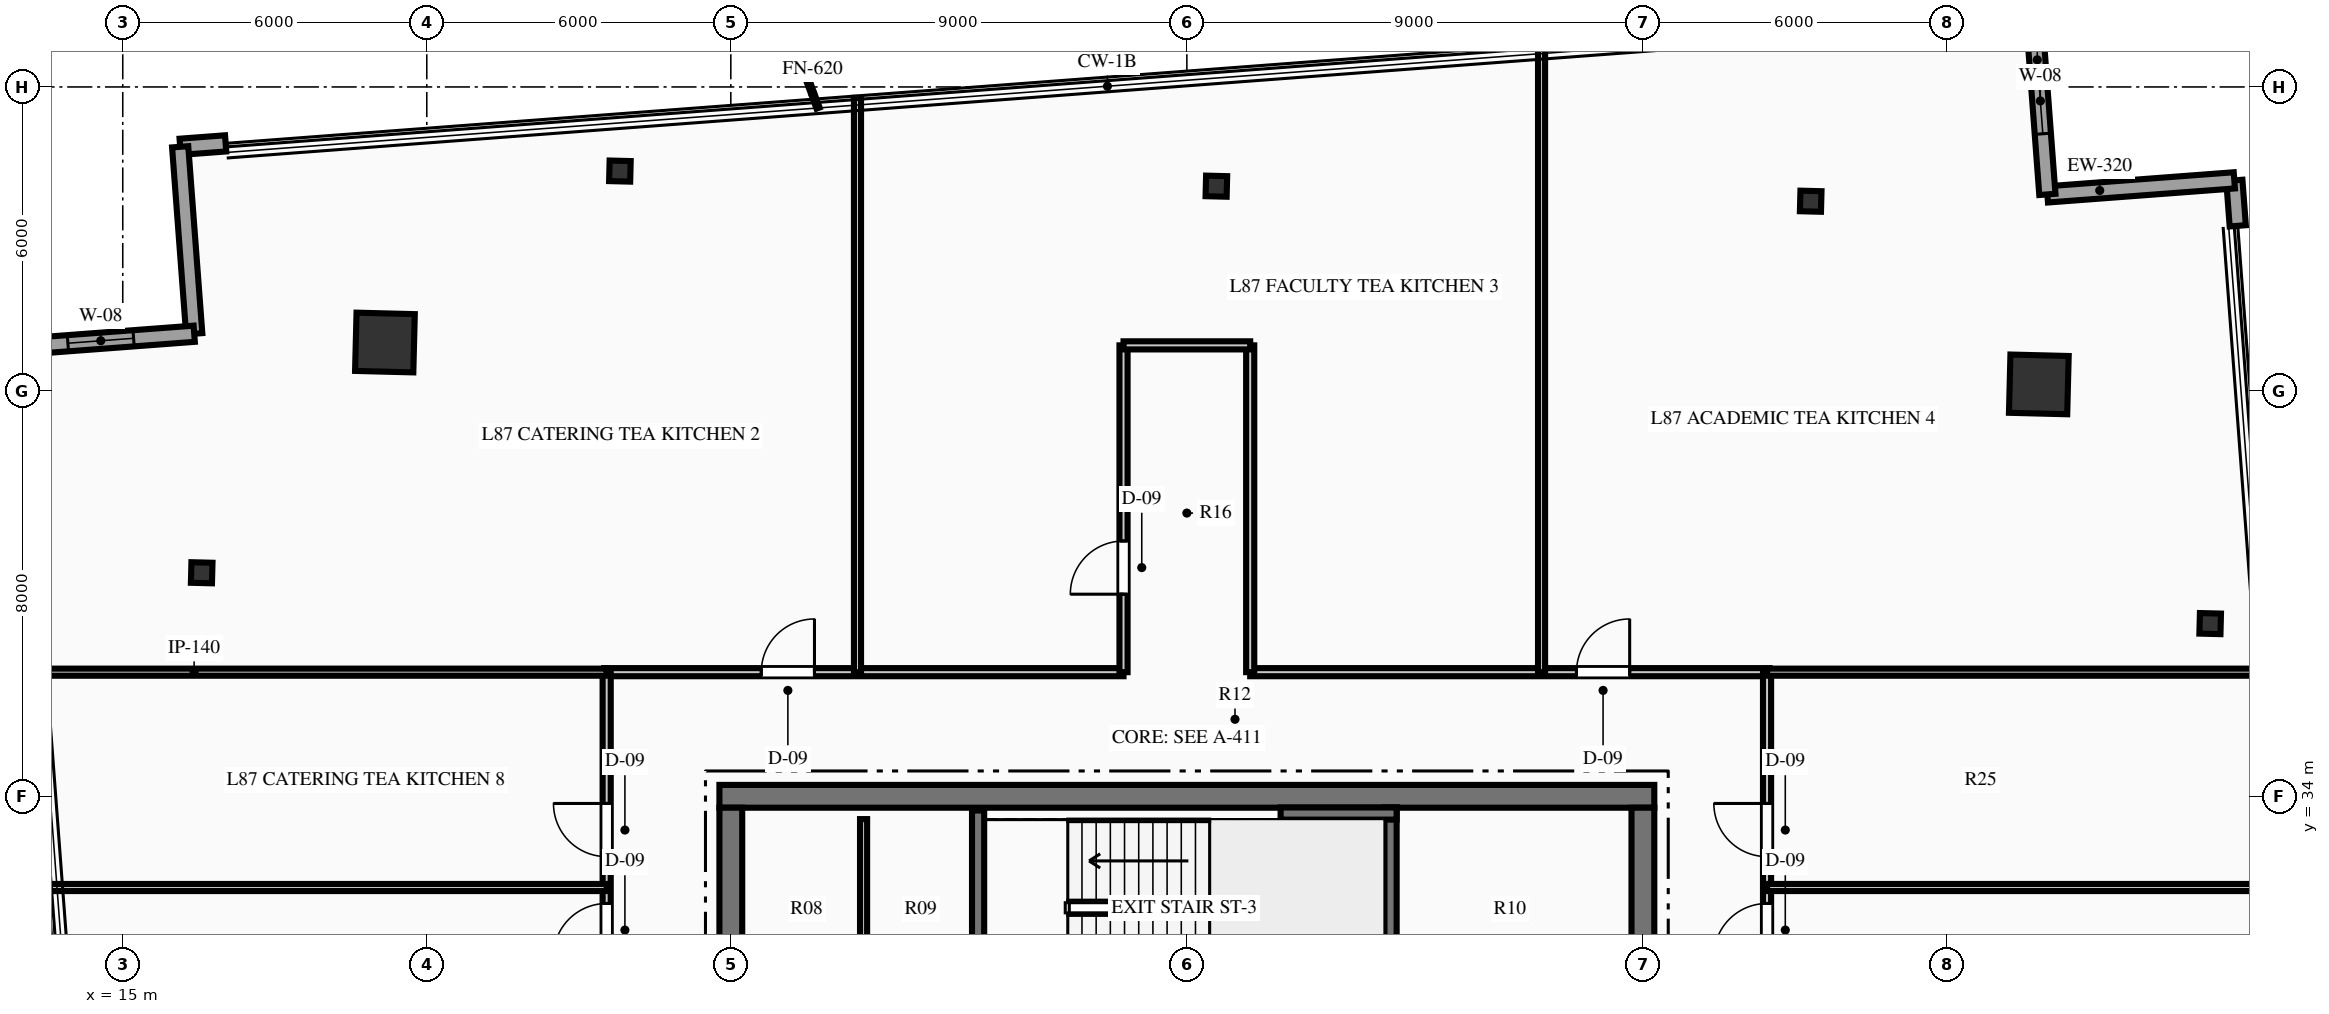
"""IFC4 building model, lengths in metres.
Left out: names, types, materials, properties, quantities, classifications, styles, units other than length and angle.
Written with IfcOpenShell. Run it as: python <this file> out.ifc"""

import sys

from ifc_helpers import new_model, si_unit, direction, frame, frame_2d, origin, origin_2d, place, context, subcontext, project, spatial, rectangle, hollow_rectangle, i_section, extrude, element, fill, save


model = new_model("IFC4")
c1 = context("Model", 3, precision=1e-05, world=origin(), true_north=direction((0.0, 1.0)))
c2 = subcontext(c1, "Body", "Model", "MODEL_VIEW")
j1 = project(units=[si_unit("LENGTHUNIT", "METRE"), si_unit("PLANEANGLEUNIT", "RADIAN")], contexts=[c1])
p1 = place(None, origin())
s1 = spatial("IfcSite", under=j1, at=p1, CompositionType="ELEMENT")
p2 = place(p1, origin())
s2 = spatial("IfcBuilding", under=s1, at=p2, CompositionType="ELEMENT")
p3 = place(p2, frame((0.0, 0.0, 343.95)))
s3 = spatial("IfcBuildingStorey", under=s2, at=p3, CompositionType="ELEMENT", Elevation=343.95)
p4 = place(p3, frame((26.775, 34.0, 0.0), z_axis=(0.0, 0.0, 1.0), x_axis=(1.0, 0.0, 0.0)))
e1 = element("IfcWall", 1, at=p4, inside=s3, PredefinedType="SHEAR", context=c2, shape_type="SweptSolid", body=[
    extrude(rectangle(XDim=18.45, YDim=0.45, at=frame_2d((9.225, 0.0))), origin(), (0.0, 0.0, 1.0), 3.75),
])
p5 = place(p3, frame((27.0, 18.225, 0.0), z_axis=(0.0, 0.0, 1.0), x_axis=(0.0, 1.0, 0.0)))
e2 = element("IfcWall", 2, at=p5, inside=s3, PredefinedType="SHEAR", context=c2, shape_type="SweptSolid", body=[
    extrude(rectangle(XDim=15.55, YDim=0.45, at=frame_2d((7.775, 0.0))), origin(), (0.0, 0.0, 1.0), 3.75),
])
p6 = place(p5, frame((10.015, 0.0, 0.0)))
e3 = element("IfcOpeningElement", 3, at=p6, cuts=e2, PredefinedType="OPENING", context=c2, shape_type="SweptSolid", body=[
    extrude(rectangle(XDim=1.4, YDim=2.2, at=frame_2d((0.7, 1.1))), frame((0.0, 0.235, 0.0), z_axis=(0.0, -1.0, 0.0), x_axis=(1.0, 0.0, 0.0)), (0.0, 0.0, 1.0), 0.47),
])
p7 = place(p3, frame((45.0, 18.225, 0.0), z_axis=(0.0, 0.0, 1.0), x_axis=(0.0, 1.0, 0.0)))
e4 = element("IfcWall", 4, at=p7, inside=s3, PredefinedType="SHEAR", context=c2, shape_type="SweptSolid", body=[
    extrude(rectangle(XDim=15.55, YDim=0.45, at=frame_2d((7.775, 0.0))), origin(), (0.0, 0.0, 1.0), 3.75),
])
p8 = place(p7, frame((10.015, 0.0, 0.0)))
e5 = element("IfcOpeningElement", 5, at=p8, cuts=e4, PredefinedType="OPENING", context=c2, shape_type="SweptSolid", body=[
    extrude(rectangle(XDim=1.4, YDim=2.2, at=frame_2d((0.7, 1.1))), frame((0.0, 0.235, 0.0), z_axis=(0.0, -1.0, 0.0), x_axis=(1.0, 0.0, 0.0)), (0.0, 0.0, 1.0), 0.47),
])
p9 = place(p3, frame((31.88, 29.93, 0.0), z_axis=(0.0, 0.0, 1.0), x_axis=(0.0, 1.0, 0.0)))
e6 = element("IfcWall", 6, at=p9, inside=s3, PredefinedType="SHEAR", context=c2, shape_type="SweptSolid", body=[
    extrude(rectangle(XDim=3.79, YDim=0.24, at=frame_2d((1.895, 0.0))), origin(), (0.0, 0.0, 1.0), 3.75),
])
p10 = place(p3, frame((40.02, 29.93, 0.0), z_axis=(0.0, 0.0, 1.0), x_axis=(0.0, 1.0, 0.0)))
e7 = element("IfcWall", 7, at=p10, inside=s3, PredefinedType="SHEAR", context=c2, shape_type="SweptSolid", body=[
    extrude(rectangle(XDim=3.85, YDim=0.24, at=frame_2d((1.925, 0.0))), origin(), (0.0, 0.0, 1.0), 3.75),
])
p11 = place(p3, frame((37.85, 33.66, 0.0), z_axis=(0.0, 0.0, 1.0), x_axis=(1.0, 0.0, 0.0)))
e8 = element("IfcWall", 8, at=p11, inside=s3, PredefinedType="SHEAR", context=c2, shape_type="SweptSolid", body=[
    extrude(rectangle(XDim=2.29, YDim=0.24, at=frame_2d((1.145, 0.0))), origin(), (0.0, 0.0, 1.0), 3.75),
])
for number, where, z_axis, x_axis in (
    (9, (52.813, 42.13, 0.0), (0.0, 0.0, 1.0), (0.025, 1.0, 0.0)),
    (10, (20.174, 42.956, 0.0), (0.0, 0.0, 1.0), (0.025, 1.0, 0.0)),
):
    element("IfcColumn", number, at=place(p3, frame(where, z_axis=z_axis, x_axis=x_axis)), inside=s3, PredefinedType="COLUMN", context=c2, shape_type="SweptSolid", body=[
        extrude(hollow_rectangle(XDim=1.15, YDim=1.15, WallThickness=0.05, at=origin_2d()), origin(), (0.0, 0.0, 1.0), 3.75),
    ])
for number, where, z_axis, x_axis in (
    (11, (56.195, 37.409, 0.0), (0.0, 0.0, 1.0), (0.025, 1.0, 0.0)),
    (12, (48.312, 45.745, 0.0), (0.0, 0.0, 1.0), (0.025, 1.0, 0.0)),
    (13, (36.582, 46.042, 0.0), (0.0, 0.0, 1.0), (0.025, 1.0, 0.0)),
    (14, (24.811, 46.34, 0.0), (0.0, 0.0, 1.0), (0.025, 1.0, 0.0)),
    (15, (16.558, 38.412, 0.0), (0.0, 0.0, 1.0), (0.025, 1.0, 0.0)),
):
    element("IfcColumn", number, at=place(p3, frame(where, z_axis=z_axis, x_axis=x_axis)), inside=s3, PredefinedType="COLUMN", context=c2, shape_type="SweptSolid", body=[
        extrude(i_section(OverallWidth=0.406, OverallDepth=0.416, WebThickness=0.03, FlangeThickness=0.048, at=origin_2d()), origin(), (0.0, 0.0, 1.0), 3.75),
    ])
p12 = place(p3, frame((56.672, 46.157, 0.0), z_axis=(0.0, 0.0, 1.0), x_axis=(0.075140616575, -0.997172947758, 0.0)))
e16 = element("IfcWall", 16, at=p12, inside=s3, PredefinedType="STANDARD", context=c2, shape_type="SweptSolid", body=[
    extrude(rectangle(XDim=0.9, YDim=0.32, at=frame_2d((0.45, 0.0))), origin(), (0.0, 0.0, 1.0), 3.43),
])
p13 = place(p3, frame((52.982, 45.879, 0.0), z_axis=(0.0, 0.0, 1.0), x_axis=(0.99718649992, 0.074960552138, 0.0)))
e17 = element("IfcWall", 17, at=p13, inside=s3, PredefinedType="STANDARD", context=c2, shape_type="SweptSolid", body=[
    extrude(rectangle(XDim=3.7, YDim=0.32, at=frame_2d((1.85, 0.0))), origin(), (0.0, 0.0, 1.0), 3.43),
])
p14 = place(p3, frame((52.705, 49.569, 0.0), z_axis=(0.0, 0.0, 1.0), x_axis=(0.075026167269, -0.997181565325, 0.0)))
e18 = element("IfcWall", 18, at=p14, inside=s3, PredefinedType="STANDARD", context=c2, shape_type="SweptSolid", body=[
    extrude(rectangle(XDim=3.7, YDim=0.32, at=frame_2d((1.85, 0.0))), origin(), (0.0, 0.0, 1.0), 3.43),
])
p15 = place(p14, frame((1.2, 0.0, 0.85)))
e19 = element("IfcOpeningElement", 19, at=p15, cuts=e18, PredefinedType="OPENING", context=c2, shape_type="SweptSolid", body=[
    extrude(rectangle(XDim=1.3, YDim=1.9, at=frame_2d((0.65, 0.95))), frame((0.0, 0.17, 0.0), z_axis=(0.0, -1.0, 0.0), x_axis=(1.0, 0.0, 0.0)), (0.0, 0.0, 1.0), 0.34),
])
p16 = place(p3, frame((16.133, 46.819, 0.0), z_axis=(0.0, 0.0, 1.0), x_axis=(0.997193237142, 0.074870874171, 0.0)))
e20 = element("IfcWall", 20, at=p16, inside=s3, PredefinedType="STANDARD", context=c2, shape_type="SweptSolid", body=[
    extrude(rectangle(XDim=0.9, YDim=0.32, at=frame_2d((0.45, 0.0))), origin(), (0.0, 0.0, 1.0), 3.43),
])
p17 = place(p3, frame((16.41, 43.129, 0.0), z_axis=(0.0, 0.0, 1.0), x_axis=(-0.074955620001, 0.997186870667, 0.0)))
e21 = element("IfcWall", 21, at=p17, inside=s3, PredefinedType="STANDARD", context=c2, shape_type="SweptSolid", body=[
    extrude(rectangle(XDim=3.7, YDim=0.32, at=frame_2d((1.85, 0.0))), origin(), (0.0, 0.0, 1.0), 3.43),
])
p18 = place(p3, frame((12.721, 42.852, 0.0), z_axis=(0.0, 0.0, 1.0), x_axis=(0.99718649992, 0.074960552138, 0.0)))
e22 = element("IfcWall", 22, at=p18, inside=s3, PredefinedType="STANDARD", context=c2, shape_type="SweptSolid", body=[
    extrude(rectangle(XDim=3.7, YDim=0.32, at=frame_2d((1.85, 0.0))), origin(), (0.0, 0.0, 1.0), 3.43),
])
p19 = place(p18, frame((1.2, 0.0, 0.85)))
e23 = element("IfcOpeningElement", 23, at=p19, cuts=e22, PredefinedType="OPENING", context=c2, shape_type="SweptSolid", body=[
    extrude(rectangle(XDim=1.3, YDim=1.9, at=frame_2d((0.65, 0.95))), frame((0.0, 0.17, 0.0), z_axis=(0.0, -1.0, 0.0), x_axis=(1.0, 0.0, 0.0)), (0.0, 0.0, 1.0), 0.34),
])
p20 = place(p3, frame((29.62, 29.95, 0.0), z_axis=(0.0, 0.0, 1.0), x_axis=(0.0, 1.0, 0.0)))
e24 = element("IfcWall", 24, at=p20, inside=s3, PredefinedType="PARTITIONING", context=c2, shape_type="SweptSolid", body=[
    extrude(rectangle(XDim=3.6, YDim=0.14, at=frame_2d((1.8, 0.0))), origin(), (0.0, 0.0, 1.0), 3.43),
])
p21 = place(p3, frame((24.5, 36.45, 0.0), z_axis=(0.0, 0.0, 1.0), x_axis=(1.0, 0.0, 0.0)))
e25 = element("IfcWall", 25, at=p21, inside=s3, PredefinedType="PARTITIONING", context=c2, shape_type="SweptSolid", body=[
    extrude(rectangle(XDim=10.25, YDim=0.16, at=frame_2d((5.125, 0.0))), origin(), (0.0, 0.0, 1.0), 3.43),
])
p22 = place(p21, frame((3.101, 0.0, 0.0)))
e26 = element("IfcOpeningElement", 26, at=p22, cuts=e25, PredefinedType="OPENING", context=c2, shape_type="SweptSolid", body=[
    extrude(rectangle(XDim=1.05, YDim=2.15, at=frame_2d((0.525, 1.075))), frame((0.0, 0.09, 0.0), z_axis=(0.0, -1.0, 0.0), x_axis=(1.0, 0.0, 0.0)), (0.0, 0.0, 1.0), 0.18),
])
p23 = place(p3, frame((37.25, 36.45, 0.0), z_axis=(0.0, 0.0, 1.0), x_axis=(1.0, 0.0, 0.0)))
e27 = element("IfcWall", 27, at=p23, inside=s3, PredefinedType="PARTITIONING", context=c2, shape_type="SweptSolid", body=[
    extrude(rectangle(XDim=10.25, YDim=0.16, at=frame_2d((5.125, 0.0))), origin(), (0.0, 0.0, 1.0), 3.43),
])
p24 = place(p23, frame((6.439, 0.0, 0.0)))
e28 = element("IfcOpeningElement", 28, at=p24, cuts=e27, PredefinedType="OPENING", context=c2, shape_type="SweptSolid", body=[
    extrude(rectangle(XDim=1.05, YDim=2.15, at=frame_2d((0.525, 1.075))), frame((0.0, 0.09, 0.0), z_axis=(0.0, -1.0, 0.0), x_axis=(1.0, 0.0, 0.0)), (0.0, 0.0, 1.0), 0.18),
])
p25 = place(p3, frame((24.55, 27.25, 0.0), z_axis=(0.0, 0.0, 1.0), x_axis=(0.0, 1.0, 0.0)))
e29 = element("IfcWall", 29, at=p25, inside=s3, PredefinedType="PARTITIONING", context=c2, shape_type="SweptSolid", body=[
    extrude(rectangle(XDim=9.2, YDim=0.16, at=frame_2d((4.6, 0.0))), origin(), (0.0, 0.0, 1.0), 3.43),
])
p26 = place(p25, frame((3.585, 0.0, 0.0)))
e30 = element("IfcOpeningElement", 30, at=p26, cuts=e29, PredefinedType="OPENING", context=c2, shape_type="SweptSolid", body=[
    extrude(rectangle(XDim=1.05, YDim=2.15, at=frame_2d((0.525, 1.075))), frame((0.0, 0.09, 0.0), z_axis=(0.0, -1.0, 0.0), x_axis=(1.0, 0.0, 0.0)), (0.0, 0.0, 1.0), 0.18),
])
p27 = place(p25, frame((5.559, 0.0, 0.0)))
e31 = element("IfcOpeningElement", 31, at=p27, cuts=e29, PredefinedType="OPENING", context=c2, shape_type="SweptSolid", body=[
    extrude(rectangle(XDim=1.05, YDim=2.15, at=frame_2d((0.525, 1.075))), frame((0.0, 0.09, 0.0), z_axis=(0.0, -1.0, 0.0), x_axis=(1.0, 0.0, 0.0)), (0.0, 0.0, 1.0), 0.18),
])
p28 = place(p3, frame((47.45, 27.25, 0.0), z_axis=(0.0, 0.0, 1.0), x_axis=(0.0, 1.0, 0.0)))
e32 = element("IfcWall", 32, at=p28, inside=s3, PredefinedType="PARTITIONING", context=c2, shape_type="SweptSolid", body=[
    extrude(rectangle(XDim=9.2, YDim=0.16, at=frame_2d((4.6, 0.0))), origin(), (0.0, 0.0, 1.0), 3.43),
])
p29 = place(p28, frame((3.585, 0.0, 0.0)))
e33 = element("IfcOpeningElement", 33, at=p29, cuts=e32, PredefinedType="OPENING", context=c2, shape_type="SweptSolid", body=[
    extrude(rectangle(XDim=1.05, YDim=2.15, at=frame_2d((0.525, 1.075))), frame((0.0, 0.09, 0.0), z_axis=(0.0, -1.0, 0.0), x_axis=(1.0, 0.0, 0.0)), (0.0, 0.0, 1.0), 0.18),
])
p30 = place(p28, frame((5.559, 0.0, 0.0)))
e34 = element("IfcOpeningElement", 34, at=p30, cuts=e32, PredefinedType="OPENING", context=c2, shape_type="SweptSolid", body=[
    extrude(rectangle(XDim=1.05, YDim=2.15, at=frame_2d((0.525, 1.075))), frame((0.0, 0.09, 0.0), z_axis=(0.0, -1.0, 0.0), x_axis=(1.0, 0.0, 0.0)), (0.0, 0.0, 1.0), 0.18),
])
p31 = place(p3, frame((34.75, 36.45, 0.0), z_axis=(0.0, 0.0, 1.0), x_axis=(0.0, 1.0, 0.0)))
e35 = element("IfcWall", 35, at=p31, inside=s3, PredefinedType="PARTITIONING", context=c2, shape_type="SweptSolid", body=[
    extrude(rectangle(XDim=6.45, YDim=0.16, at=frame_2d((3.225, 0.0))), origin(), (0.0, 0.0, 1.0), 3.43),
])
p32 = place(p31, frame((1.539, 0.0, 0.0)))
e36 = element("IfcOpeningElement", 36, at=p32, cuts=e35, PredefinedType="OPENING", context=c2, shape_type="SweptSolid", body=[
    extrude(rectangle(XDim=1.05, YDim=2.15, at=frame_2d((0.525, 1.075))), frame((0.0, 0.09, 0.0), z_axis=(0.0, -1.0, 0.0), x_axis=(1.0, 0.0, 0.0)), (0.0, 0.0, 1.0), 0.18),
])
p33 = place(p3, frame((37.25, 36.45, 0.0), z_axis=(0.0, 0.0, 1.0), x_axis=(0.0, 1.0, 0.0)))
e37 = element("IfcWall", 37, at=p33, inside=s3, PredefinedType="PARTITIONING", context=c2, shape_type="SweptSolid", body=[
    extrude(rectangle(XDim=6.45, YDim=0.16, at=frame_2d((3.225, 0.0))), origin(), (0.0, 0.0, 1.0), 3.43),
])
p34 = place(p3, frame((34.75, 42.9, 0.0), z_axis=(0.0, 0.0, 1.0), x_axis=(1.0, 0.0, 0.0)))
e38 = element("IfcWall", 38, at=p34, inside=s3, PredefinedType="PARTITIONING", context=c2, shape_type="SweptSolid", body=[
    extrude(rectangle(XDim=2.5, YDim=0.16, at=frame_2d((1.25, 0.0))), origin(), (0.0, 0.0, 1.0), 3.43),
])
p35 = place(p3, frame((13.242, 36.45, 0.0), z_axis=(0.0, 0.0, 1.0), x_axis=(1.0, 0.0, 0.0)))
e39 = element("IfcWall", 39, at=p35, inside=s3, PredefinedType="PARTITIONING", context=c2, shape_type="SweptSolid", body=[
    extrude(rectangle(XDim=11.308, YDim=0.14, at=frame_2d((5.654, 0.0))), origin(), (0.0, 0.0, 1.0), 3.019),
])
p36 = place(p3, frame((47.45, 36.45, 0.0), z_axis=(0.0, 0.0, 1.0), x_axis=(1.0, 0.0, 0.0)))
e40 = element("IfcWall", 40, at=p36, inside=s3, PredefinedType="PARTITIONING", context=c2, shape_type="SweptSolid", body=[
    extrude(rectangle(XDim=9.912, YDim=0.14, at=frame_2d((4.956, 0.0))), origin(), (0.0, 0.0, 1.0), 2.808),
])
p37 = place(p3, frame((29.5, 36.45, 0.0), z_axis=(0.0, 0.0, 1.0), x_axis=(0.0, 1.0, 0.0)))
e41 = element("IfcWall", 41, at=p37, inside=s3, PredefinedType="PARTITIONING", context=c2, shape_type="SweptSolid", body=[
    extrude(rectangle(XDim=11.334, YDim=0.14, at=frame_2d((5.667, 0.0))), origin(), (0.0, 0.0, 1.0), 3.43),
])
p38 = place(p3, frame((43.0, 36.45, 0.0), z_axis=(0.0, 0.0, 1.0), x_axis=(0.0, 1.0, 0.0)))
e42 = element("IfcWall", 42, at=p38, inside=s3, PredefinedType="PARTITIONING", context=c2, shape_type="SweptSolid", body=[
    extrude(rectangle(XDim=12.349, YDim=0.14, at=frame_2d((6.175, 0.0))), origin(), (0.0, 0.0, 1.0), 3.43),
])
p39 = place(p3, frame((13.562, 32.2, 0.0), z_axis=(0.0, 0.0, 1.0), x_axis=(1.0, 0.0, 0.0)))
e43 = element("IfcWall", 43, at=p39, inside=s3, PredefinedType="PARTITIONING", context=c2, shape_type="SweptSolid", body=[
    extrude(rectangle(XDim=10.988, YDim=0.14, at=frame_2d((5.494, 0.0))), origin(), (0.0, 0.0, 1.0), 3.43),
])
p40 = place(p3, frame((47.45, 32.2, 0.0), z_axis=(0.0, 0.0, 1.0), x_axis=(1.0, 0.0, 0.0)))
e44 = element("IfcWall", 44, at=p40, inside=s3, PredefinedType="PARTITIONING", context=c2, shape_type="SweptSolid", body=[
    extrude(rectangle(XDim=10.231, YDim=0.14, at=frame_2d((5.116, 0.0))), origin(), (0.0, 0.0, 1.0), 3.43),
])
p41 = place(p15, origin())
e45 = element("IfcWindow", 45, at=p41, inside=s3, PartitioningType="SINGLE_PANEL", PredefinedType="WINDOW", context=c2, shape_type="SweptSolid", body=[
    extrude(rectangle(XDim=1.3, YDim=1.9, at=frame_2d((0.65, 0.95))), frame((0.0, 0.03, 0.0), z_axis=(0.0, -1.0, 0.0), x_axis=(1.0, 0.0, 0.0)), (0.0, 0.0, 1.0), 0.06),
])
fill(e19, e45)
p42 = place(p19, origin())
e46 = element("IfcWindow", 46, at=p42, inside=s3, PartitioningType="SINGLE_PANEL", PredefinedType="WINDOW", context=c2, shape_type="SweptSolid", body=[
    extrude(rectangle(XDim=1.3, YDim=1.9, at=frame_2d((0.65, 0.95))), frame((0.0, 0.03, 0.0), z_axis=(0.0, -1.0, 0.0), x_axis=(1.0, 0.0, 0.0)), (0.0, 0.0, 1.0), 0.06),
])
fill(e23, e46)
p43 = place(p22, origin())
e47 = element("IfcDoor", 47, at=p43, inside=s3, OperationType="SINGLE_SWING_RIGHT", PredefinedType="DOOR", context=c2, shape_type="SweptSolid", body=[
    extrude(rectangle(XDim=1.05, YDim=2.15, at=frame_2d((0.525, 1.075))), frame((0.0, 0.025, 0.0), z_axis=(0.0, -1.0, 0.0), x_axis=(1.0, 0.0, 0.0)), (0.0, 0.0, 1.0), 0.05),
])
fill(e26, e47)
p44 = place(p32, origin())
e48 = element("IfcDoor", 48, at=p44, inside=s3, OperationType="SINGLE_SWING_LEFT", PredefinedType="DOOR", context=c2, shape_type="SweptSolid", body=[
    extrude(rectangle(XDim=1.05, YDim=2.15, at=frame_2d((0.525, 1.075))), frame((0.0, 0.025, 0.0), z_axis=(0.0, -1.0, 0.0), x_axis=(1.0, 0.0, 0.0)), (0.0, 0.0, 1.0), 0.05),
])
fill(e36, e48)
p45 = place(p24, origin())
e49 = element("IfcDoor", 49, at=p45, inside=s3, OperationType="SINGLE_SWING_RIGHT", PredefinedType="DOOR", context=c2, shape_type="SweptSolid", body=[
    extrude(rectangle(XDim=1.05, YDim=2.15, at=frame_2d((0.525, 1.075))), frame((0.0, 0.025, 0.0), z_axis=(0.0, -1.0, 0.0), x_axis=(1.0, 0.0, 0.0)), (0.0, 0.0, 1.0), 0.05),
])
fill(e28, e49)
p46 = place(p26, origin())
e50 = element("IfcDoor", 50, at=p46, inside=s3, OperationType="SINGLE_SWING_LEFT", PredefinedType="DOOR", context=c2, shape_type="SweptSolid", body=[
    extrude(rectangle(XDim=1.05, YDim=2.15, at=frame_2d((0.525, 1.075))), frame((0.0, 0.025, 0.0), z_axis=(0.0, -1.0, 0.0), x_axis=(1.0, 0.0, 0.0)), (0.0, 0.0, 1.0), 0.05),
])
fill(e30, e50)
p47 = place(p27, origin())
e51 = element("IfcDoor", 51, at=p47, inside=s3, OperationType="SINGLE_SWING_RIGHT", PredefinedType="DOOR", context=c2, shape_type="SweptSolid", body=[
    extrude(rectangle(XDim=1.05, YDim=2.15, at=frame_2d((0.525, 1.075))), frame((0.0, 0.025, 0.0), z_axis=(0.0, -1.0, 0.0), x_axis=(1.0, 0.0, 0.0)), (0.0, 0.0, 1.0), 0.05),
])
fill(e31, e51)
p48 = place(p29, origin())
e52 = element("IfcDoor", 52, at=p48, inside=s3, OperationType="SINGLE_SWING_LEFT", PredefinedType="DOOR", context=c2, shape_type="SweptSolid", body=[
    extrude(rectangle(XDim=1.05, YDim=2.15, at=frame_2d((0.525, 1.075))), frame((0.0, 0.025, 0.0), z_axis=(0.0, -1.0, 0.0), x_axis=(1.0, 0.0, 0.0)), (0.0, 0.0, 1.0), 0.05),
])
fill(e33, e52)
p49 = place(p30, origin())
e53 = element("IfcDoor", 53, at=p49, inside=s3, OperationType="SINGLE_SWING_RIGHT", PredefinedType="DOOR", context=c2, shape_type="SweptSolid", body=[
    extrude(rectangle(XDim=1.05, YDim=2.15, at=frame_2d((0.525, 1.075))), frame((0.0, 0.025, 0.0), z_axis=(0.0, -1.0, 0.0), x_axis=(1.0, 0.0, 0.0)), (0.0, 0.0, 1.0), 0.05),
])
fill(e34, e53)
save(model, sys.argv[1])
